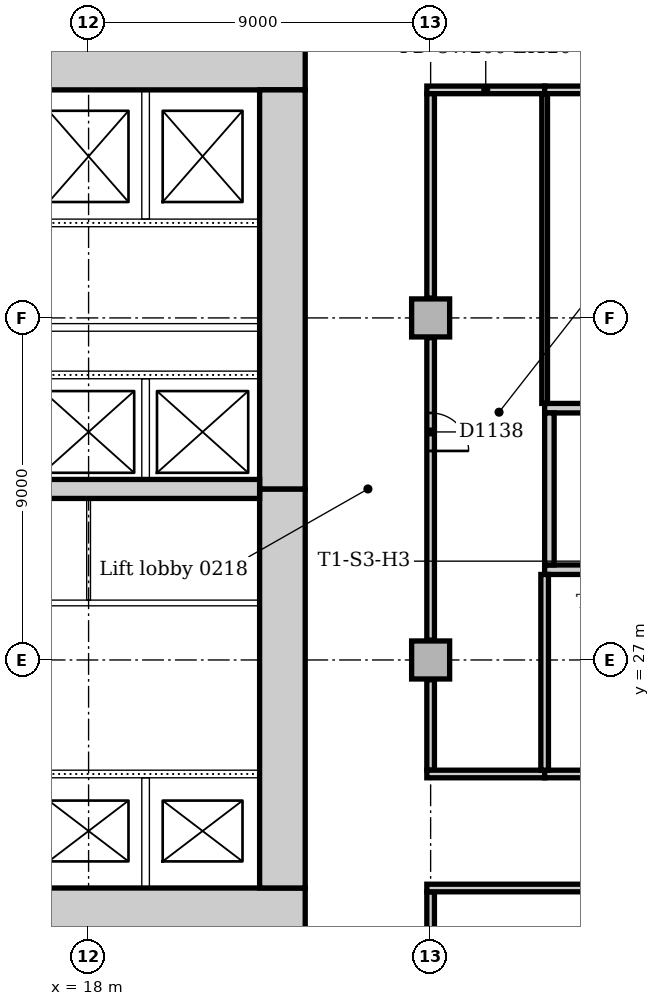
"""IFC4 building model, lengths in metres.
Left out: names, types, materials, properties, quantities, classifications, styles, units other than length and angle.
Written with IfcOpenShell. Run it as: python <this file> out.ifc"""

import sys

from ifc_helpers import new_model, si_unit, direction, frame, frame_2d, origin, origin_2d, place, context, subcontext, project, spatial, rectangle, extrude, element, fill, save


model = new_model("IFC4")
c1 = context("Model", 3, precision=1e-05, world=origin(), true_north=direction((0.0, 1.0)))
c2 = subcontext(c1, "Body", "Model", "MODEL_VIEW")
j1 = project(units=[si_unit("LENGTHUNIT", "METRE"), si_unit("PLANEANGLEUNIT", "RADIAN")], contexts=[c1])
p1 = place(None, origin())
s1 = spatial("IfcSite", under=j1, at=p1, CompositionType="ELEMENT")
p2 = place(p1, origin())
s2 = spatial("IfcBuilding", under=s1, at=p2, CompositionType="ELEMENT")
p3 = place(p2, frame((0.0, 0.0, 11.0)))
s3 = spatial("IfcBuildingStorey", under=s2, at=p3, CompositionType="ELEMENT", Elevation=11.0)
for number, where, z_axis, x_axis in (
    (1, (3.9, 20.4, 0.0), (0.0, 0.0, 1.0), (1.0, 0.0, 0.0)),
    (2, (23.7, 42.6, 0.0), (0.0, 0.0, 1.0), (-1.0, 0.0, 0.0)),
):
    element("IfcWall", number, at=place(p3, frame(where, z_axis=z_axis, x_axis=x_axis)), inside=s3, PredefinedType="SOLIDWALL", context=c2, shape_type="SweptSolid", body=[
        extrude(rectangle(XDim=19.8, YDim=1.2, at=frame_2d((9.9, 0.0))), origin(), (0.0, 0.0, 1.0), 5.0),
    ])
p4 = place(p3, frame((23.1, 21.0, 0.0), z_axis=(0.0, 0.0, 1.0), x_axis=(0.0, 1.0, 0.0)))
e3 = element("IfcWall", 3, at=p4, inside=s3, PredefinedType="SOLIDWALL", context=c2, shape_type="SweptSolid", body=[
    extrude(rectangle(XDim=10.5, YDim=1.2, at=frame_2d((5.25, 0.0))), origin(), (0.0, 0.0, 1.0), 5.0),
])
p5 = place(p4, frame((4.35, 0.0, 0.0)))
e4 = element("IfcOpeningElement", 4, at=p5, cuts=e3, PredefinedType="OPENING", context=c2, shape_type="SweptSolid", body=[
    extrude(rectangle(XDim=1.8, YDim=2.1, at=frame_2d((0.9, 1.05))), frame((0.0, 0.61, 0.0), z_axis=(0.0, -1.0, 0.0), x_axis=(1.0, 0.0, 0.0)), (0.0, 0.0, 1.0), 1.22),
])
p6 = place(p3, frame((23.1, 31.5, 0.0), z_axis=(0.0, 0.0, 1.0), x_axis=(0.0, 1.0, 0.0)))
e5 = element("IfcWall", 5, at=p6, inside=s3, PredefinedType="SOLIDWALL", context=c2, shape_type="SweptSolid", body=[
    extrude(rectangle(XDim=10.5, YDim=1.2, at=frame_2d((5.25, 0.0))), origin(), (0.0, 0.0, 1.0), 5.0),
])
p7 = place(p6, frame((3.15, 0.0, 0.0)))
e6 = element("IfcOpeningElement", 6, at=p7, cuts=e5, PredefinedType="OPENING", context=c2, shape_type="SweptSolid", body=[
    extrude(rectangle(XDim=1.0, YDim=2.1, at=frame_2d((0.5, 1.05))), frame((0.0, 0.61, 0.0), z_axis=(0.0, -1.0, 0.0), x_axis=(1.0, 0.0, 0.0)), (0.0, 0.0, 1.0), 1.22),
])
p8 = place(p6, frame((5.2, 0.0, 0.0)))
e7 = element("IfcOpeningElement", 7, at=p8, cuts=e5, PredefinedType="OPENING", context=c2, shape_type="SweptSolid", body=[
    extrude(rectangle(XDim=1.0, YDim=2.1, at=frame_2d((0.5, 1.05))), frame((0.0, 0.61, 0.0), z_axis=(0.0, -1.0, 0.0), x_axis=(1.0, 0.0, 0.0)), (0.0, 0.0, 1.0), 1.22),
])
p9 = place(p3, frame((4.5, 31.5, 0.0), z_axis=(0.0, 0.0, 1.0), x_axis=(1.0, 0.0, 0.0)))
e8 = element("IfcWall", 8, at=p9, inside=s3, PredefinedType="SOLIDWALL", context=c2, shape_type="SweptSolid", body=[
    extrude(rectangle(XDim=18.0, YDim=0.5, at=frame_2d((9.0, 0.0))), origin(), (0.0, 0.0, 1.0), 5.0),
])
for number, where, z_axis, x_axis in (
    (9, (30.0, 29.375, 0.0), (0.0, 0.0, 1.0), (1.0, 0.0, 0.0)),
    (10, (37.5, 33.625, 0.0), (0.0, 0.0, 1.0), (-1.0, 0.0, 0.0)),
):
    element("IfcWall", number, at=place(p3, frame(where, z_axis=z_axis, x_axis=x_axis)), inside=s3, PredefinedType="SOLIDWALL", context=c2, shape_type="SweptSolid", body=[
        extrude(rectangle(XDim=7.5, YDim=0.25, at=frame_2d((3.75, 0.0))), origin(), (0.0, 0.0, 1.0), 5.0),
    ])
p10 = place(p3, frame((30.125, 33.5, 0.0), z_axis=(0.0, 0.0, 1.0), x_axis=(0.0, -1.0, 0.0)))
e11 = element("IfcWall", 11, at=p10, inside=s3, PredefinedType="SOLIDWALL", context=c2, shape_type="SweptSolid", body=[
    extrude(rectangle(XDim=4.0, YDim=0.25, at=frame_2d((2.0, 0.0))), origin(), (0.0, 0.0, 1.0), 5.0),
])
for number, where, z_axis, x_axis in (
    (12, (27.0, 27.0, 0.0), (0.0, 0.0, 1.0), (1.0, 0.0, 0.0)),
    (13, (27.0, 36.0, 0.0), (0.0, 0.0, 1.0), (1.0, 0.0, 0.0)),
):
    element("IfcColumn", number, at=place(p3, frame(where, z_axis=z_axis, x_axis=x_axis)), inside=s3, PredefinedType="COLUMN", context=c2, shape_type="SweptSolid", body=[
        extrude(rectangle(XDim=1.0, YDim=1.0, at=origin_2d()), origin(), (0.0, 0.0, 1.0), 4.7),
    ])
p11 = place(p3, frame((26.9, 42.0, 0.0), z_axis=(0.0, 0.0, 1.0), x_axis=(1.0, 0.0, 0.0)))
e14 = element("IfcWall", 14, at=p11, inside=s3, PredefinedType="PARTITIONING", context=c2, shape_type="SweptSolid", body=[
    extrude(rectangle(XDim=3.1, YDim=0.2, at=frame_2d((1.55, 0.0))), origin(), (0.0, 0.0, 1.0), 4.7),
])
p12 = place(p3, frame((30.0, 42.0, 0.0), z_axis=(0.0, 0.0, 1.0), x_axis=(1.0, 0.0, 0.0)))
e15 = element("IfcWall", 15, at=p12, inside=s3, PredefinedType="PARTITIONING", context=c2, shape_type="SweptSolid", body=[
    extrude(rectangle(XDim=7.5, YDim=0.2, at=frame_2d((3.75, 0.0))), origin(), (0.0, 0.0, 1.0), 4.7),
])
p13 = place(p12, frame((3.25, 0.0, 0.0)))
e16 = element("IfcOpeningElement", 16, at=p13, cuts=e15, PredefinedType="OPENING", context=c2, shape_type="SweptSolid", body=[
    extrude(rectangle(XDim=1.0, YDim=2.1, at=frame_2d((0.5, 1.05))), frame((0.0, 0.11, 0.0), z_axis=(0.0, -1.0, 0.0), x_axis=(1.0, 0.0, 0.0)), (0.0, 0.0, 1.0), 0.22),
])
for number, where, z_axis, x_axis in (
    (17, (27.0, 18.52, 0.0), (0.0, 0.0, 1.0), (0.0, 1.0, 0.0)),
    (18, (27.0, 24.1, 0.0), (0.0, 0.0, 1.0), (0.0, 1.0, 0.0)),
):
    element("IfcWall", number, at=place(p3, frame(where, z_axis=z_axis, x_axis=x_axis)), inside=s3, PredefinedType="PARTITIONING", context=c2, shape_type="SweptSolid", body=[
        extrude(rectangle(XDim=2.38, YDim=0.2, at=frame_2d((1.19, 0.0))), origin(), (0.0, 0.0, 1.0), 4.7),
    ])
p14 = place(p3, frame((27.0, 27.52, 0.0), z_axis=(0.0, 0.0, 1.0), x_axis=(0.0, 1.0, 0.0)))
e19 = element("IfcWall", 19, at=p14, inside=s3, PredefinedType="PARTITIONING", context=c2, shape_type="SweptSolid", body=[
    extrude(rectangle(XDim=7.96, YDim=0.2, at=frame_2d((3.98, 0.0))), origin(), (0.0, 0.0, 1.0), 4.7),
])
p15 = place(p14, frame((4.98, 0.0, 0.0)))
e20 = element("IfcOpeningElement", 20, at=p15, cuts=e19, PredefinedType="OPENING", context=c2, shape_type="SweptSolid", body=[
    extrude(rectangle(XDim=1.0, YDim=2.1, at=frame_2d((0.5, 1.05))), frame((0.0, 0.11, 0.0), z_axis=(0.0, -1.0, 0.0), x_axis=(1.0, 0.0, 0.0)), (0.0, 0.0, 1.0), 0.22),
])
p16 = place(p3, frame((27.0, 36.52, 0.0), z_axis=(0.0, 0.0, 1.0), x_axis=(0.0, 1.0, 0.0)))
e21 = element("IfcWall", 21, at=p16, inside=s3, PredefinedType="PARTITIONING", context=c2, shape_type="SweptSolid", body=[
    extrude(rectangle(XDim=5.38, YDim=0.2, at=frame_2d((2.69, 0.0))), origin(), (0.0, 0.0, 1.0), 4.7),
])
p17 = place(p3, frame((26.9, 21.0, 0.0), z_axis=(0.0, 0.0, 1.0), x_axis=(1.0, 0.0, 0.0)))
e22 = element("IfcWall", 22, at=p17, inside=s3, PredefinedType="PARTITIONING", context=c2, shape_type="SweptSolid", body=[
    extrude(rectangle(XDim=9.1, YDim=0.2, at=frame_2d((4.55, 0.0))), origin(), (0.0, 0.0, 1.0), 4.7),
])
p18 = place(p3, frame((26.9, 24.0, 0.0), z_axis=(0.0, 0.0, 1.0), x_axis=(1.0, 0.0, 0.0)))
e23 = element("IfcWall", 23, at=p18, inside=s3, PredefinedType="PARTITIONING", context=c2, shape_type="SweptSolid", body=[
    extrude(rectangle(XDim=3.1, YDim=0.2, at=frame_2d((1.55, 0.0))), origin(), (0.0, 0.0, 1.0), 4.7),
])
p19 = place(p3, frame((30.0, 24.0, 0.0), z_axis=(0.0, 0.0, 1.0), x_axis=(1.0, 0.0, 0.0)))
e24 = element("IfcWall", 24, at=p19, inside=s3, PredefinedType="PARTITIONING", context=c2, shape_type="SweptSolid", body=[
    extrude(rectangle(XDim=7.5, YDim=0.2, at=frame_2d((3.75, 0.0))), origin(), (0.0, 0.0, 1.0), 4.7),
])
p20 = place(p19, frame((3.25, 0.0, 0.0)))
e25 = element("IfcOpeningElement", 25, at=p20, cuts=e24, PredefinedType="OPENING", context=c2, shape_type="SweptSolid", body=[
    extrude(rectangle(XDim=1.0, YDim=2.1, at=frame_2d((0.5, 1.05))), frame((0.0, 0.11, 0.0), z_axis=(0.0, -1.0, 0.0), x_axis=(1.0, 0.0, 0.0)), (0.0, 0.0, 1.0), 0.22),
])
p21 = place(p3, frame((30.0, 24.1, 0.0), z_axis=(0.0, 0.0, 1.0), x_axis=(0.0, 1.0, 0.0)))
e26 = element("IfcWall", 26, at=p21, inside=s3, PredefinedType="PARTITIONING", context=c2, shape_type="SweptSolid", body=[
    extrude(rectangle(XDim=5.15, YDim=0.2, at=frame_2d((2.575, 0.0))), origin(), (0.0, 0.0, 1.0), 4.7),
])
p22 = place(p3, frame((30.0, 33.75, 0.0), z_axis=(0.0, 0.0, 1.0), x_axis=(0.0, 1.0, 0.0)))
e27 = element("IfcWall", 27, at=p22, inside=s3, PredefinedType="PARTITIONING", context=c2, shape_type="SweptSolid", body=[
    extrude(rectangle(XDim=8.15, YDim=0.15, at=frame_2d((4.075, 0.0))), origin(), (0.0, 0.0, 1.0), 4.7),
])
p23 = place(p3, frame((16.4, 35.75, 0.0), z_axis=(0.0, 0.0, 1.0), x_axis=(1.0, 0.0, 0.0)))
e28 = element("IfcWall", 28, at=p23, inside=s3, PredefinedType="PARTITIONING", context=c2, shape_type="SweptSolid", body=[
    extrude(rectangle(XDim=6.1, YDim=0.2, at=frame_2d((3.05, 0.0))), origin(), (0.0, 0.0, 1.0), 4.7),
])
p24 = place(p3, frame((16.4, 38.5, 0.0), z_axis=(0.0, 0.0, 1.0), x_axis=(1.0, 0.0, 0.0)))
e29 = element("IfcWall", 29, at=p24, inside=s3, PredefinedType="PARTITIONING", context=c2, shape_type="SweptSolid", body=[
    extrude(rectangle(XDim=6.1, YDim=0.2, at=frame_2d((3.05, 0.0))), origin(), (0.0, 0.0, 1.0), 4.7),
])
p25 = place(p24, frame((1.0, 0.0, 0.0)))
e30 = element("IfcOpeningElement", 30, at=p25, cuts=e29, PredefinedType="OPENING", context=c2, shape_type="SweptSolid", body=[
    extrude(rectangle(XDim=1.2, YDim=2.1, at=frame_2d((0.6, 1.05))), frame((0.0, 0.11, 0.0), z_axis=(0.0, -1.0, 0.0), x_axis=(1.0, 0.0, 0.0)), (0.0, 0.0, 1.0), 0.22),
])
p26 = place(p24, frame((4.0, 0.0, 0.0)))
e31 = element("IfcOpeningElement", 31, at=p26, cuts=e29, PredefinedType="OPENING", context=c2, shape_type="SweptSolid", body=[
    extrude(rectangle(XDim=1.2, YDim=2.1, at=frame_2d((0.6, 1.05))), frame((0.0, 0.11, 0.0), z_axis=(0.0, -1.0, 0.0), x_axis=(1.0, 0.0, 0.0)), (0.0, 0.0, 1.0), 0.22),
])
p27 = place(p3, frame((4.5, 24.0, 0.0), z_axis=(0.0, 0.0, 1.0), x_axis=(1.0, 0.0, 0.0)))
e32 = element("IfcWall", 32, at=p27, inside=s3, PredefinedType="PARTITIONING", context=c2, shape_type="SweptSolid", body=[
    extrude(rectangle(XDim=18.0, YDim=0.2, at=frame_2d((9.0, 0.0))), origin(), (0.0, 0.0, 1.0), 4.7),
])
p28 = place(p27, frame((0.95, 0.0, 0.0)))
e33 = element("IfcOpeningElement", 33, at=p28, cuts=e32, PredefinedType="OPENING", context=c2, shape_type="SweptSolid", body=[
    extrude(rectangle(XDim=1.1, YDim=2.1, at=frame_2d((0.55, 1.05))), frame((0.0, 0.11, 0.0), z_axis=(0.0, -1.0, 0.0), x_axis=(1.0, 0.0, 0.0)), (0.0, 0.0, 1.0), 0.22),
])
p29 = place(p27, frame((3.95, 0.0, 0.0)))
e34 = element("IfcOpeningElement", 34, at=p29, cuts=e32, PredefinedType="OPENING", context=c2, shape_type="SweptSolid", body=[
    extrude(rectangle(XDim=1.1, YDim=2.1, at=frame_2d((0.55, 1.05))), frame((0.0, 0.11, 0.0), z_axis=(0.0, -1.0, 0.0), x_axis=(1.0, 0.0, 0.0)), (0.0, 0.0, 1.0), 0.22),
])
p30 = place(p27, frame((6.95, 0.0, 0.0)))
e35 = element("IfcOpeningElement", 35, at=p30, cuts=e32, PredefinedType="OPENING", context=c2, shape_type="SweptSolid", body=[
    extrude(rectangle(XDim=1.1, YDim=2.1, at=frame_2d((0.55, 1.05))), frame((0.0, 0.11, 0.0), z_axis=(0.0, -1.0, 0.0), x_axis=(1.0, 0.0, 0.0)), (0.0, 0.0, 1.0), 0.22),
])
p31 = place(p27, frame((9.95, 0.0, 0.0)))
e36 = element("IfcOpeningElement", 36, at=p31, cuts=e32, PredefinedType="OPENING", context=c2, shape_type="SweptSolid", body=[
    extrude(rectangle(XDim=1.1, YDim=2.1, at=frame_2d((0.55, 1.05))), frame((0.0, 0.11, 0.0), z_axis=(0.0, -1.0, 0.0), x_axis=(1.0, 0.0, 0.0)), (0.0, 0.0, 1.0), 0.22),
])
p32 = place(p27, frame((12.95, 0.0, 0.0)))
e37 = element("IfcOpeningElement", 37, at=p32, cuts=e32, PredefinedType="OPENING", context=c2, shape_type="SweptSolid", body=[
    extrude(rectangle(XDim=1.1, YDim=2.1, at=frame_2d((0.55, 1.05))), frame((0.0, 0.11, 0.0), z_axis=(0.0, -1.0, 0.0), x_axis=(1.0, 0.0, 0.0)), (0.0, 0.0, 1.0), 0.22),
])
p33 = place(p27, frame((15.95, 0.0, 0.0)))
e38 = element("IfcOpeningElement", 38, at=p33, cuts=e32, PredefinedType="OPENING", context=c2, shape_type="SweptSolid", body=[
    extrude(rectangle(XDim=1.1, YDim=2.1, at=frame_2d((0.55, 1.05))), frame((0.0, 0.11, 0.0), z_axis=(0.0, -1.0, 0.0), x_axis=(1.0, 0.0, 0.0)), (0.0, 0.0, 1.0), 0.22),
])
p34 = place(p3, frame((4.5, 34.5, 0.0), z_axis=(0.0, 0.0, 1.0), x_axis=(1.0, 0.0, 0.0)))
e39 = element("IfcWall", 39, at=p34, inside=s3, PredefinedType="PARTITIONING", context=c2, shape_type="SweptSolid", body=[
    extrude(rectangle(XDim=18.0, YDim=0.2, at=frame_2d((9.0, 0.0))), origin(), (0.0, 0.0, 1.0), 4.7),
])
p35 = place(p34, frame((0.95, 0.0, 0.0)))
e40 = element("IfcOpeningElement", 40, at=p35, cuts=e39, PredefinedType="OPENING", context=c2, shape_type="SweptSolid", body=[
    extrude(rectangle(XDim=1.1, YDim=2.1, at=frame_2d((0.55, 1.05))), frame((0.0, 0.11, 0.0), z_axis=(0.0, -1.0, 0.0), x_axis=(1.0, 0.0, 0.0)), (0.0, 0.0, 1.0), 0.22),
])
p36 = place(p34, frame((3.95, 0.0, 0.0)))
e41 = element("IfcOpeningElement", 41, at=p36, cuts=e39, PredefinedType="OPENING", context=c2, shape_type="SweptSolid", body=[
    extrude(rectangle(XDim=1.1, YDim=2.1, at=frame_2d((0.55, 1.05))), frame((0.0, 0.11, 0.0), z_axis=(0.0, -1.0, 0.0), x_axis=(1.0, 0.0, 0.0)), (0.0, 0.0, 1.0), 0.22),
])
p37 = place(p34, frame((12.95, 0.0, 0.0)))
e42 = element("IfcOpeningElement", 42, at=p37, cuts=e39, PredefinedType="OPENING", context=c2, shape_type="SweptSolid", body=[
    extrude(rectangle(XDim=1.1, YDim=2.1, at=frame_2d((0.55, 1.05))), frame((0.0, 0.11, 0.0), z_axis=(0.0, -1.0, 0.0), x_axis=(1.0, 0.0, 0.0)), (0.0, 0.0, 1.0), 0.22),
])
p38 = place(p34, frame((15.95, 0.0, 0.0)))
e43 = element("IfcOpeningElement", 43, at=p38, cuts=e39, PredefinedType="OPENING", context=c2, shape_type="SweptSolid", body=[
    extrude(rectangle(XDim=1.1, YDim=2.1, at=frame_2d((0.55, 1.05))), frame((0.0, 0.11, 0.0), z_axis=(0.0, -1.0, 0.0), x_axis=(1.0, 0.0, 0.0)), (0.0, 0.0, 1.0), 0.22),
])
p39 = place(p3, frame((19.5, 38.6, 0.0), z_axis=(0.0, 0.0, 1.0), x_axis=(0.0, 1.0, 0.0)))
e44 = element("IfcWall", 44, at=p39, inside=s3, PredefinedType="PARTITIONING", context=c2, shape_type="SweptSolid", body=[
    extrude(rectangle(XDim=3.4, YDim=0.2, at=frame_2d((1.7, 0.0))), origin(), (0.0, 0.0, 1.0), 4.7),
])
p40 = place(p3, frame((19.5, 21.0, 0.0), z_axis=(0.0, 0.0, 1.0), x_axis=(0.0, 1.0, 0.0)))
e45 = element("IfcWall", 45, at=p40, inside=s3, PredefinedType="PARTITIONING", context=c2, shape_type="SweptSolid", body=[
    extrude(rectangle(XDim=2.9, YDim=0.2, at=frame_2d((1.45, 0.0))), origin(), (0.0, 0.0, 1.0), 4.7),
])
p41 = place(p3, frame((19.5, 31.75, 0.0), z_axis=(0.0, 0.0, 1.0), x_axis=(0.0, 1.0, 0.0)))
e46 = element("IfcWall", 46, at=p41, inside=s3, PredefinedType="PARTITIONING", context=c2, shape_type="SweptSolid", body=[
    extrude(rectangle(XDim=2.65, YDim=0.2, at=frame_2d((1.325, 0.0))), origin(), (0.0, 0.0, 1.0), 4.7),
])
p42 = place(p3, frame((4.5, 28.5, 0.0), z_axis=(0.0, 0.0, 1.0), x_axis=(1.0, 0.0, 0.0)))
e47 = element("IfcWall", 47, at=p42, inside=s3, PredefinedType="PARTITIONING", context=c2, shape_type="SweptSolid", body=[
    extrude(rectangle(XDim=18.0, YDim=0.15, at=frame_2d((9.0, 0.0))), origin(), (0.0, 0.0, 1.0), 4.7),
])
p43 = place(p42, frame((4.1, 0.0, 0.0)))
e48 = element("IfcOpeningElement", 48, at=p43, cuts=e47, PredefinedType="OPENING", context=c2, shape_type="SweptSolid", body=[
    extrude(rectangle(XDim=0.9, YDim=2.1, at=frame_2d((0.45, 1.05))), frame((0.0, 0.085, 0.0), z_axis=(0.0, -1.0, 0.0), x_axis=(1.0, 0.0, 0.0)), (0.0, 0.0, 1.0), 0.17),
])
p44 = place(p42, frame((10.8, 0.0, 0.0)))
e49 = element("IfcOpeningElement", 49, at=p44, cuts=e47, PredefinedType="OPENING", context=c2, shape_type="SweptSolid", body=[
    extrude(rectangle(XDim=0.9, YDim=2.1, at=frame_2d((0.45, 1.05))), frame((0.0, 0.085, 0.0), z_axis=(0.0, -1.0, 0.0), x_axis=(1.0, 0.0, 0.0)), (0.0, 0.0, 1.0), 0.17),
])
p45 = place(p42, frame((15.2, 0.0, 0.0)))
e50 = element("IfcOpeningElement", 50, at=p45, cuts=e47, PredefinedType="OPENING", context=c2, shape_type="SweptSolid", body=[
    extrude(rectangle(XDim=0.9, YDim=2.1, at=frame_2d((0.45, 1.05))), frame((0.0, 0.085, 0.0), z_axis=(0.0, -1.0, 0.0), x_axis=(1.0, 0.0, 0.0)), (0.0, 0.0, 1.0), 0.17),
])
p46 = place(p3, frame((18.0, 28.575, 0.0), z_axis=(0.0, 0.0, 1.0), x_axis=(0.0, 1.0, 0.0)))
e51 = element("IfcWall", 51, at=p46, inside=s3, PredefinedType="PARTITIONING", context=c2, shape_type="SweptSolid", body=[
    extrude(rectangle(XDim=2.675, YDim=0.1, at=frame_2d((1.337, 0.0))), origin(), (0.0, 0.0, 1.0), 4.7),
])
p47 = place(p15, frame((1.0, 0.0, 0.0), z_axis=(0.0, 0.0, 1.0), x_axis=(-1.0, 0.0, 0.0)))
e52 = element("IfcDoor", 52, at=p47, inside=s3, OperationType="SINGLE_SWING_RIGHT", PredefinedType="DOOR", context=c2, shape_type="SweptSolid", body=[
    extrude(rectangle(XDim=1.0, YDim=2.1, at=frame_2d((0.5, 1.05))), frame((0.0, 0.025, 0.0), z_axis=(0.0, -1.0, 0.0), x_axis=(1.0, 0.0, 0.0)), (0.0, 0.0, 1.0), 0.05),
])
fill(e20, e52)
p48 = place(p32, origin())
e53 = element("IfcDoor", 53, at=p48, inside=s3, OperationType="SLIDING_TO_LEFT", PredefinedType="DOOR", context=c2, shape_type="SweptSolid", body=[
    extrude(rectangle(XDim=1.1, YDim=2.1, at=frame_2d((0.55, 1.05))), frame((0.0, 0.025, 0.0), z_axis=(0.0, -1.0, 0.0), x_axis=(1.0, 0.0, 0.0)), (0.0, 0.0, 1.0), 0.05),
])
fill(e37, e53)
p49 = place(p33, origin())
e54 = element("IfcDoor", 54, at=p49, inside=s3, OperationType="SLIDING_TO_LEFT", PredefinedType="DOOR", context=c2, shape_type="SweptSolid", body=[
    extrude(rectangle(XDim=1.1, YDim=2.1, at=frame_2d((0.55, 1.05))), frame((0.0, 0.025, 0.0), z_axis=(0.0, -1.0, 0.0), x_axis=(1.0, 0.0, 0.0)), (0.0, 0.0, 1.0), 0.05),
])
fill(e38, e54)
p50 = place(p37, origin())
e55 = element("IfcDoor", 55, at=p50, inside=s3, OperationType="SLIDING_TO_LEFT", PredefinedType="DOOR", context=c2, shape_type="SweptSolid", body=[
    extrude(rectangle(XDim=1.1, YDim=2.1, at=frame_2d((0.55, 1.05))), frame((0.0, 0.025, 0.0), z_axis=(0.0, -1.0, 0.0), x_axis=(1.0, 0.0, 0.0)), (0.0, 0.0, 1.0), 0.05),
])
fill(e42, e55)
p51 = place(p38, origin())
e56 = element("IfcDoor", 56, at=p51, inside=s3, OperationType="SLIDING_TO_LEFT", PredefinedType="DOOR", context=c2, shape_type="SweptSolid", body=[
    extrude(rectangle(XDim=1.1, YDim=2.1, at=frame_2d((0.55, 1.05))), frame((0.0, 0.025, 0.0), z_axis=(0.0, -1.0, 0.0), x_axis=(1.0, 0.0, 0.0)), (0.0, 0.0, 1.0), 0.05),
])
fill(e43, e56)
p52 = place(p25, origin())
e57 = element("IfcDoor", 57, at=p52, inside=s3, OperationType="SLIDING_TO_LEFT", PredefinedType="DOOR", context=c2, shape_type="SweptSolid", body=[
    extrude(rectangle(XDim=1.2, YDim=2.1, at=frame_2d((0.6, 1.05))), frame((0.0, 0.025, 0.0), z_axis=(0.0, -1.0, 0.0), x_axis=(1.0, 0.0, 0.0)), (0.0, 0.0, 1.0), 0.05),
])
fill(e30, e57)
p53 = place(p26, origin())
e58 = element("IfcDoor", 58, at=p53, inside=s3, OperationType="SLIDING_TO_LEFT", PredefinedType="DOOR", context=c2, shape_type="SweptSolid", body=[
    extrude(rectangle(XDim=1.2, YDim=2.1, at=frame_2d((0.6, 1.05))), frame((0.0, 0.025, 0.0), z_axis=(0.0, -1.0, 0.0), x_axis=(1.0, 0.0, 0.0)), (0.0, 0.0, 1.0), 0.05),
])
fill(e31, e58)
p54 = place(p5, origin())
e59 = element("IfcDoor", 59, at=p54, inside=s3, OperationType="DOUBLE_DOOR_DOUBLE_SWING", PredefinedType="DOOR", context=c2, shape_type="SweptSolid", body=[
    extrude(rectangle(XDim=1.8, YDim=2.1, at=frame_2d((0.9, 1.05))), frame((0.0, 0.025, 0.0), z_axis=(0.0, -1.0, 0.0), x_axis=(1.0, 0.0, 0.0)), (0.0, 0.0, 1.0), 0.05),
])
fill(e4, e59)
p55 = place(p7, frame((1.0, 0.0, 0.0), z_axis=(0.0, 0.0, 1.0), x_axis=(-1.0, 0.0, 0.0)))
e60 = element("IfcDoor", 60, at=p55, inside=s3, OperationType="SINGLE_SWING_RIGHT", PredefinedType="DOOR", context=c2, shape_type="SweptSolid", body=[
    extrude(rectangle(XDim=1.0, YDim=2.1, at=frame_2d((0.5, 1.05))), frame((0.0, 0.025, 0.0), z_axis=(0.0, -1.0, 0.0), x_axis=(1.0, 0.0, 0.0)), (0.0, 0.0, 1.0), 0.05),
])
fill(e6, e60)
p56 = place(p8, frame((1.0, 0.0, 0.0), z_axis=(0.0, 0.0, 1.0), x_axis=(-1.0, 0.0, 0.0)))
e61 = element("IfcDoor", 61, at=p56, inside=s3, OperationType="SINGLE_SWING_LEFT", PredefinedType="DOOR", context=c2, shape_type="SweptSolid", body=[
    extrude(rectangle(XDim=1.0, YDim=2.1, at=frame_2d((0.5, 1.05))), frame((0.0, 0.025, 0.0), z_axis=(0.0, -1.0, 0.0), x_axis=(1.0, 0.0, 0.0)), (0.0, 0.0, 1.0), 0.05),
])
fill(e7, e61)
p57 = place(p45, origin())
e62 = element("IfcDoor", 62, at=p57, inside=s3, OperationType="SINGLE_SWING_LEFT", PredefinedType="DOOR", context=c2, shape_type="SweptSolid", body=[
    extrude(rectangle(XDim=0.9, YDim=2.1, at=frame_2d((0.45, 1.05))), frame((0.0, 0.025, 0.0), z_axis=(0.0, -1.0, 0.0), x_axis=(1.0, 0.0, 0.0)), (0.0, 0.0, 1.0), 0.05),
])
fill(e50, e62)
save(model, sys.argv[1])
